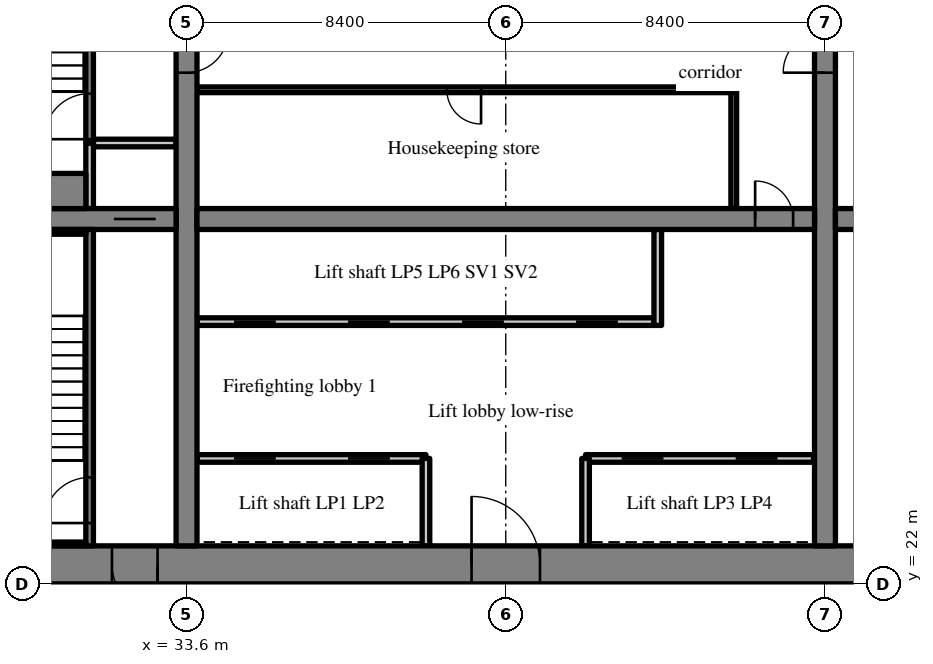
"""IFC4 building model, lengths in metres.
Left out: names, types, materials, properties, quantities, classifications, styles, units other than length and angle.
Written with IfcOpenShell. Run it as: python <this file> out.ifc"""

import sys

from ifc_helpers import new_model, si_unit, direction, frame, frame_2d, origin, place, context, subcontext, project, spatial, rectangle, extrude, source, transform, mapped, element, fill, save


model = new_model("IFC4")
c1 = context("Model", 3, precision=1e-05, world=origin(), true_north=direction((0.0, 1.0)))
c2 = subcontext(c1, "Body", "Model", "MODEL_VIEW")
j1 = project(units=[si_unit("LENGTHUNIT", "METRE"), si_unit("PLANEANGLEUNIT", "RADIAN")], contexts=[c1])
p1 = place(None, origin())
s1 = spatial("IfcSite", under=j1, at=p1, CompositionType="ELEMENT")
p2 = place(p1, origin())
s2 = spatial("IfcBuilding", under=s1, at=p2, CompositionType="ELEMENT")
p3 = place(p2, frame((0.0, 0.0, 50.6)))
s3 = spatial("IfcBuildingStorey", under=s2, at=p3, CompositionType="ELEMENT", Elevation=50.6)
m1 = source(origin(), c2, "Body", "SweptSolid", [
    extrude(rectangle(XDim=50.4, YDim=1.0, at=frame_2d((25.2, 0.0))), origin(), (0.0, 0.0, 1.0), 3.52),
])
p4 = place(p3, frame((25.2, 22.5, 0.0), z_axis=(0.0, 0.0, 1.0), x_axis=(1.0, 0.0, 0.0)))
e1 = element("IfcWall", 1, at=p4, inside=s3, PredefinedType="SHEAR", context=c2, shape_type="MappedRepresentation", body=[
    mapped(m1, transform((0.0, 0.0, 0.0), scale=1.0)),
])
m2 = source(origin(), c2, "Body", "SweptSolid", [
    extrude(rectangle(XDim=1.8, YDim=2.1, at=frame_2d((0.9, 1.05))), frame((0.0, 0.51, 0.0), z_axis=(0.0, -1.0, 0.0), x_axis=(1.0, 0.0, 0.0)), (0.0, 0.0, 1.0), 1.02),
])
p5 = place(p4, frame((15.9, 0.0, 0.0)))
e2 = element("IfcOpeningElement", 2, at=p5, cuts=e1, PredefinedType="OPENING", context=c2, shape_type="MappedRepresentation", body=[
    mapped(m2, transform((0.0, 0.0, 0.0), scale=1.0)),
])
m3 = source(origin(), c2, "Body", "SweptSolid", [
    extrude(rectangle(XDim=1.2, YDim=2.1, at=frame_2d((0.6, 1.05))), frame((0.0, 0.51, 0.0), z_axis=(0.0, -1.0, 0.0), x_axis=(1.0, 0.0, 0.0)), (0.0, 0.0, 1.0), 1.02),
])
p6 = place(p4, frame((26.987, 0.0, 0.0)))
e3 = element("IfcOpeningElement", 3, at=p6, cuts=e1, PredefinedType="OPENING", context=c2, shape_type="MappedRepresentation", body=[
    mapped(m3, transform((0.0, 0.0, 0.0), scale=1.0)),
])
m4 = source(origin(), c2, "Body", "SweptSolid", [
    extrude(rectangle(XDim=0.9, YDim=2.1, at=frame_2d((0.45, 1.05))), frame((0.0, 0.51, 0.0), z_axis=(0.0, -1.0, 0.0), x_axis=(1.0, 0.0, 0.0)), (0.0, 0.0, 1.0), 1.02),
])
p7 = place(p4, frame((33.75, 0.0, 0.0)))
e4 = element("IfcOpeningElement", 4, at=p7, cuts=e1, PredefinedType="OPENING", context=c2, shape_type="MappedRepresentation", body=[
    mapped(m4, transform((0.0, 0.0, 0.0), scale=1.0)),
])
p8 = place(p4, frame((30.75, 0.0, 0.0)))
e5 = element("IfcOpeningElement", 5, at=p8, cuts=e1, PredefinedType="OPENING", context=c2, shape_type="MappedRepresentation", body=[
    mapped(m4, transform((0.0, 0.0, 0.0), scale=1.0)),
])
p9 = place(p4, frame((38.262, 0.0, 0.0)))
e6 = element("IfcOpeningElement", 6, at=p9, cuts=e1, PredefinedType="OPENING", context=c2, shape_type="MappedRepresentation", body=[
    mapped(m4, transform((0.0, 0.0, 0.0), scale=1.0)),
])
p10 = place(p4, frame((6.438, 0.0, 0.0)))
e7 = element("IfcOpeningElement", 7, at=p10, cuts=e1, PredefinedType="OPENING", context=c2, shape_type="MappedRepresentation", body=[
    mapped(m3, transform((0.0, 0.0, 0.0), scale=1.0)),
])
p11 = place(p4, frame((47.725, 0.0, 0.0)))
e8 = element("IfcOpeningElement", 8, at=p11, cuts=e1, PredefinedType="OPENING", context=c2, shape_type="MappedRepresentation", body=[
    mapped(m3, transform((0.0, 0.0, 0.0), scale=1.0)),
])
m5 = source(origin(), c2, "Body", "SweptSolid", [
    extrude(rectangle(XDim=18.0, YDim=0.55, at=frame_2d((9.0, 0.0))), origin(), (0.0, 0.0, 1.0), 3.52),
])
p12 = place(p3, frame((33.6, 23.0, 0.0), z_axis=(0.0, 0.0, 1.0), x_axis=(0.0, 1.0, 0.0)))
e9 = element("IfcWall", 9, at=p12, inside=s3, PredefinedType="SHEAR", context=c2, shape_type="MappedRepresentation", body=[
    mapped(m5, transform((0.0, 0.0, 0.0), scale=1.0)),
])
m6 = source(origin(), c2, "Body", "SweptSolid", [
    extrude(rectangle(XDim=1.1, YDim=2.1, at=frame_2d((0.55, 1.05))), frame((0.0, 0.285, 0.0), z_axis=(0.0, -1.0, 0.0), x_axis=(1.0, 0.0, 0.0)), (0.0, 0.0, 1.0), 0.57),
])
p13 = place(p12, frame((12.45, 0.0, 0.0)))
e10 = element("IfcOpeningElement", 10, at=p13, cuts=e9, PredefinedType="OPENING", context=c2, shape_type="MappedRepresentation", body=[
    mapped(m6, transform((0.0, 0.0, 0.0), scale=1.0)),
])
p14 = place(p3, frame((50.4, 23.0, 0.0), z_axis=(0.0, 0.0, 1.0), x_axis=(0.0, 1.0, 0.0)))
e11 = element("IfcWall", 11, at=p14, inside=s3, PredefinedType="SHEAR", context=c2, shape_type="MappedRepresentation", body=[
    mapped(m5, transform((0.0, 0.0, 0.0), scale=1.0)),
])
p15 = place(p14, frame((12.45, 0.0, 0.0)))
e12 = element("IfcOpeningElement", 12, at=p15, cuts=e11, PredefinedType="OPENING", context=c2, shape_type="MappedRepresentation", body=[
    mapped(m6, transform((0.0, 0.0, 0.0), scale=1.0)),
])
m7 = source(origin(), c2, "Body", "SweptSolid", [
    extrude(rectangle(XDim=7.125, YDim=0.55, at=frame_2d((3.562, 0.0))), origin(), (0.0, 0.0, 1.0), 3.52),
])
p16 = place(p3, frame((26.2, 31.6, 0.0), z_axis=(0.0, 0.0, 1.0), x_axis=(1.0, 0.0, 0.0)))
e13 = element("IfcWall", 13, at=p16, inside=s3, PredefinedType="SHEAR", context=c2, shape_type="MappedRepresentation", body=[
    mapped(m7, transform((0.0, 0.0, 0.0), scale=1.0)),
])
p17 = place(p16, frame((5.488, 0.0, 0.0)))
e14 = element("IfcOpeningElement", 14, at=p17, cuts=e13, PredefinedType="OPENING", context=c2, shape_type="MappedRepresentation", body=[
    mapped(m6, transform((0.0, 0.0, 0.0), scale=1.0)),
])
m8 = source(origin(), c2, "Body", "SweptSolid", [
    extrude(rectangle(XDim=16.25, YDim=0.55, at=frame_2d((8.125, 0.0))), origin(), (0.0, 0.0, 1.0), 3.52),
])
p18 = place(p3, frame((33.875, 31.6, 0.0), z_axis=(0.0, 0.0, 1.0), x_axis=(1.0, 0.0, 0.0)))
e15 = element("IfcWall", 15, at=p18, inside=s3, PredefinedType="SHEAR", context=c2, shape_type="MappedRepresentation", body=[
    mapped(m8, transform((0.0, 0.0, 0.0), scale=1.0)),
])
m9 = source(origin(), c2, "Body", "SweptSolid", [
    extrude(rectangle(XDim=1.0, YDim=2.1, at=frame_2d((0.5, 1.05))), frame((0.0, 0.285, 0.0), z_axis=(0.0, -1.0, 0.0), x_axis=(1.0, 0.0, 0.0)), (0.0, 0.0, 1.0), 0.57),
])
p19 = place(p18, frame((14.687, 0.0, 0.0)))
e16 = element("IfcOpeningElement", 16, at=p19, cuts=e15, PredefinedType="OPENING", context=c2, shape_type="MappedRepresentation", body=[
    mapped(m9, transform((0.0, 0.0, 0.0), scale=1.0)),
])
p20 = place(p3, frame((50.675, 31.6, 0.0), z_axis=(0.0, 0.0, 1.0), x_axis=(1.0, 0.0, 0.0)))
e17 = element("IfcWall", 17, at=p20, inside=s3, PredefinedType="SHEAR", context=c2, shape_type="MappedRepresentation", body=[
    mapped(m8, transform((0.0, 0.0, 0.0), scale=1.0)),
])
p21 = place(p20, frame((0.562, 0.0, 0.0)))
e18 = element("IfcOpeningElement", 18, at=p21, cuts=e17, PredefinedType="OPENING", context=c2, shape_type="MappedRepresentation", body=[
    mapped(m9, transform((0.0, 0.0, 0.0), scale=1.0)),
])
m10 = source(origin(), c2, "Body", "SweptSolid", [
    extrude(rectangle(XDim=6.025, YDim=0.2, at=frame_2d((3.012, 0.0))), origin(), (0.0, 0.0, 1.0), 3.52),
])
p22 = place(p3, frame((33.875, 25.3, 0.0), z_axis=(0.0, 0.0, 1.0), x_axis=(1.0, 0.0, 0.0)))
e19 = element("IfcWall", 19, at=p22, inside=s3, PredefinedType="SOLIDWALL", context=c2, shape_type="MappedRepresentation", body=[
    mapped(m10, transform((0.0, 0.0, 0.0), scale=1.0)),
])
m11 = source(origin(), c2, "Body", "SweptSolid", [
    extrude(rectangle(XDim=1.1, YDim=2.1, at=frame_2d((0.55, 1.05))), frame((0.0, 0.11, 0.0), z_axis=(0.0, -1.0, 0.0), x_axis=(1.0, 0.0, 0.0)), (0.0, 0.0, 1.0), 0.22),
])
p23 = place(p22, frame((0.975, 0.0, 0.0)))
e20 = element("IfcOpeningElement", 20, at=p23, cuts=e19, PredefinedType="OPENING", context=c2, shape_type="MappedRepresentation", body=[
    mapped(m11, transform((0.0, 0.0, 0.0), scale=1.0)),
])
p24 = place(p22, frame((3.975, 0.0, 0.0)))
e21 = element("IfcOpeningElement", 21, at=p24, cuts=e19, PredefinedType="OPENING", context=c2, shape_type="MappedRepresentation", body=[
    mapped(m11, transform((0.0, 0.0, 0.0), scale=1.0)),
])
m12 = source(origin(), c2, "Body", "SweptSolid", [
    extrude(rectangle(XDim=6.0, YDim=0.2, at=frame_2d((3.0, 0.0))), origin(), (0.0, 0.0, 1.0), 3.52),
])
p25 = place(p3, frame((44.1, 25.3, 0.0), z_axis=(0.0, 0.0, 1.0), x_axis=(1.0, 0.0, 0.0)))
e22 = element("IfcWall", 22, at=p25, inside=s3, PredefinedType="SOLIDWALL", context=c2, shape_type="MappedRepresentation", body=[
    mapped(m12, transform((0.0, 0.0, 0.0), scale=1.0)),
])
p26 = place(p25, frame((0.95, 0.0, 0.0)))
e23 = element("IfcOpeningElement", 23, at=p26, cuts=e22, PredefinedType="OPENING", context=c2, shape_type="MappedRepresentation", body=[
    mapped(m11, transform((0.0, 0.0, 0.0), scale=1.0)),
])
p27 = place(p25, frame((3.95, 0.0, 0.0)))
e24 = element("IfcOpeningElement", 24, at=p27, cuts=e22, PredefinedType="OPENING", context=c2, shape_type="MappedRepresentation", body=[
    mapped(m11, transform((0.0, 0.0, 0.0), scale=1.0)),
])
m13 = source(origin(), c2, "Body", "SweptSolid", [
    extrude(rectangle(XDim=12.025, YDim=0.2, at=frame_2d((6.012, 0.0))), origin(), (0.0, 0.0, 1.0), 3.52),
])
p28 = place(p3, frame((33.875, 28.9, 0.0), z_axis=(0.0, 0.0, 1.0), x_axis=(1.0, 0.0, 0.0)))
e25 = element("IfcWall", 25, at=p28, inside=s3, PredefinedType="SOLIDWALL", context=c2, shape_type="MappedRepresentation", body=[
    mapped(m13, transform((0.0, 0.0, 0.0), scale=1.0)),
])
p29 = place(p28, frame((0.975, 0.0, 0.0)))
e26 = element("IfcOpeningElement", 26, at=p29, cuts=e25, PredefinedType="OPENING", context=c2, shape_type="MappedRepresentation", body=[
    mapped(m11, transform((0.0, 0.0, 0.0), scale=1.0)),
])
p30 = place(p28, frame((3.975, 0.0, 0.0)))
e27 = element("IfcOpeningElement", 27, at=p30, cuts=e25, PredefinedType="OPENING", context=c2, shape_type="MappedRepresentation", body=[
    mapped(m11, transform((0.0, 0.0, 0.0), scale=1.0)),
])
p31 = place(p28, frame((6.975, 0.0, 0.0)))
e28 = element("IfcOpeningElement", 28, at=p31, cuts=e25, PredefinedType="OPENING", context=c2, shape_type="MappedRepresentation", body=[
    mapped(m11, transform((0.0, 0.0, 0.0), scale=1.0)),
])
p32 = place(p28, frame((9.975, 0.0, 0.0)))
e29 = element("IfcOpeningElement", 29, at=p32, cuts=e25, PredefinedType="OPENING", context=c2, shape_type="MappedRepresentation", body=[
    mapped(m11, transform((0.0, 0.0, 0.0), scale=1.0)),
])
m14 = source(origin(), c2, "Body", "SweptSolid", [
    extrude(rectangle(XDim=2.3, YDim=0.2, at=frame_2d((1.15, 0.0))), origin(), (0.0, 0.0, 1.0), 3.52),
])
for number, where, z_axis, x_axis in (
    (30, (39.9, 23.0, 0.0), (0.0, 0.0, 1.0), (0.0, 1.0, 0.0)),
    (31, (44.1, 23.0, 0.0), (0.0, 0.0, 1.0), (0.0, 1.0, 0.0)),
):
    element("IfcWall", number, at=place(p3, frame(where, z_axis=z_axis, x_axis=x_axis)), inside=s3, PredefinedType="SOLIDWALL", context=c2, shape_type="MappedRepresentation", body=[
        mapped(m14, transform((0.0, 0.0, 0.0), scale=1.0)),
    ])
m15 = source(origin(), c2, "Body", "SweptSolid", [
    extrude(rectangle(XDim=2.525, YDim=0.2, at=frame_2d((1.262, 0.0))), origin(), (0.0, 0.0, 1.0), 3.52),
])
p33 = place(p3, frame((46.0, 28.8, 0.0), z_axis=(0.0, 0.0, 1.0), x_axis=(0.0, 1.0, 0.0)))
e32 = element("IfcWall", 32, at=p33, inside=s3, PredefinedType="SOLIDWALL", context=c2, shape_type="MappedRepresentation", body=[
    mapped(m15, transform((0.0, 0.0, 0.0), scale=1.0)),
])
m16 = source(origin(), c2, "Body", "SweptSolid", [
    extrude(rectangle(XDim=3.125, YDim=0.15, at=frame_2d((1.562, 0.0))), origin(), (0.0, 0.0, 1.0), 3.52),
])
p34 = place(p3, frame((48.0, 31.875, 0.0), z_axis=(0.0, 0.0, 1.0), x_axis=(0.0, 1.0, 0.0)))
e33 = element("IfcWall", 33, at=p34, inside=s3, PredefinedType="PARTITIONING", context=c2, shape_type="MappedRepresentation", body=[
    mapped(m16, transform((0.0, 0.0, 0.0), scale=1.0)),
])
m17 = source(origin(), c2, "Body", "SweptSolid", [
    extrude(rectangle(XDim=14.125, YDim=0.15, at=frame_2d((7.062, 0.0))), origin(), (0.0, 0.0, 1.0), 3.52),
])
p35 = place(p3, frame((33.875, 35.0, 0.0), z_axis=(0.0, 0.0, 1.0), x_axis=(1.0, 0.0, 0.0)))
e34 = element("IfcWall", 34, at=p35, inside=s3, PredefinedType="PARTITIONING", context=c2, shape_type="MappedRepresentation", body=[
    mapped(m17, transform((0.0, 0.0, 0.0), scale=1.0)),
])
m18 = source(origin(), c2, "Body", "SweptSolid", [
    extrude(rectangle(XDim=0.9, YDim=2.1, at=frame_2d((0.45, 1.05))), frame((0.0, 0.085, 0.0), z_axis=(0.0, -1.0, 0.0), x_axis=(1.0, 0.0, 0.0)), (0.0, 0.0, 1.0), 0.17),
])
p36 = place(p35, frame((6.575, 0.0, 0.0)))
e35 = element("IfcOpeningElement", 35, at=p36, cuts=e34, PredefinedType="OPENING", context=c2, shape_type="MappedRepresentation", body=[
    mapped(m18, transform((0.0, 0.0, 0.0), scale=1.0)),
])
m19 = source(origin(), c2, "Body", "SweptSolid", [
    extrude(rectangle(XDim=8.325, YDim=0.2, at=frame_2d((4.163, 0.0))), origin(), (0.0, 0.0, 1.0), 3.52),
])
p37 = place(p3, frame((31.05, 23.0, 0.0), z_axis=(0.0, 0.0, 1.0), x_axis=(0.0, 1.0, 0.0)))
e36 = element("IfcWall", 36, at=p37, inside=s3, PredefinedType="SOLIDWALL", context=c2, shape_type="MappedRepresentation", body=[
    mapped(m19, transform((0.0, 0.0, 0.0), scale=1.0)),
])
m20 = source(origin(), c2, "Body", "SweptSolid", [
    extrude(rectangle(XDim=1.2, YDim=2.1, at=frame_2d((0.6, 1.05))), frame((0.0, 0.11, 0.0), z_axis=(0.0, -1.0, 0.0), x_axis=(1.0, 0.0, 0.0)), (0.0, 0.0, 1.0), 0.22),
])
p38 = place(p37, frame((0.6, 0.0, 0.0)))
e37 = element("IfcOpeningElement", 37, at=p38, cuts=e36, PredefinedType="OPENING", context=c2, shape_type="MappedRepresentation", body=[
    mapped(m20, transform((0.0, 0.0, 0.0), scale=1.0)),
])
m21 = source(origin(), c2, "Body", "SweptSolid", [
    extrude(rectangle(XDim=1.725, YDim=0.2, at=frame_2d((0.863, 0.0))), origin(), (0.0, 0.0, 1.0), 3.52),
])
p39 = place(p3, frame((31.05, 31.875, 0.0), z_axis=(0.0, 0.0, 1.0), x_axis=(0.0, 1.0, 0.0)))
e38 = element("IfcWall", 38, at=p39, inside=s3, PredefinedType="SOLIDWALL", context=c2, shape_type="MappedRepresentation", body=[
    mapped(m21, transform((0.0, 0.0, 0.0), scale=1.0)),
])
m22 = source(origin(), c2, "Body", "SweptSolid", [
    extrude(rectangle(XDim=2.175, YDim=0.2, at=frame_2d((1.087, 0.0))), origin(), (0.0, 0.0, 1.0), 3.52),
])
p40 = place(p3, frame((31.15, 33.6, 0.0), z_axis=(0.0, 0.0, 1.0), x_axis=(1.0, 0.0, 0.0)))
e39 = element("IfcWall", 39, at=p40, inside=s3, PredefinedType="SOLIDWALL", context=c2, shape_type="MappedRepresentation", body=[
    mapped(m22, transform((0.0, 0.0, 0.0), scale=1.0)),
])
m23 = source(origin(), c2, "Body", "SweptSolid", [
    extrude(rectangle(XDim=7.4, YDim=0.2, at=frame_2d((3.7, 0.0))), origin(), (0.0, 0.0, 1.0), 3.52),
])
p41 = place(p3, frame((31.05, 33.6, 0.0), z_axis=(0.0, 0.0, 1.0), x_axis=(0.0, 1.0, 0.0)))
e40 = element("IfcWall", 40, at=p41, inside=s3, PredefinedType="SOLIDWALL", context=c2, shape_type="MappedRepresentation", body=[
    mapped(m23, transform((0.0, 0.0, 0.0), scale=1.0)),
])
p42 = place(p41, frame((0.1, 0.0, 0.0)))
e41 = element("IfcOpeningElement", 41, at=p42, cuts=e40, PredefinedType="OPENING", context=c2, shape_type="MappedRepresentation", body=[
    mapped(m20, transform((0.0, 0.0, 0.0), scale=1.0)),
])
m24 = source(origin(), c2, "Body", "SweptSolid", [
    extrude(rectangle(XDim=4.75, YDim=0.1, at=frame_2d((2.375, 0.0))), origin(), (0.0, 0.0, 1.0), 3.52),
])
p43 = place(p3, frame((26.2, 23.05, 0.0), z_axis=(0.0, 0.0, 1.0), x_axis=(1.0, 0.0, 0.0)))
e42 = element("IfcWall", 42, at=p43, inside=s3, PredefinedType="SOLIDWALL", context=c2, shape_type="MappedRepresentation", body=[
    mapped(m24, transform((0.0, 0.0, 0.0), scale=1.0)),
])
m25 = source(origin(), c2, "Body", "SweptSolid", [
    extrude(rectangle(XDim=4.75, YDim=0.125, at=frame_2d((2.375, 0.0))), origin(), (0.0, 0.0, 1.0), 3.52),
])
p44 = place(p3, frame((26.2, 31.262, 0.0), z_axis=(0.0, 0.0, 1.0), x_axis=(1.0, 0.0, 0.0)))
e43 = element("IfcWall", 43, at=p44, inside=s3, PredefinedType="SOLIDWALL", context=c2, shape_type="MappedRepresentation", body=[
    mapped(m25, transform((0.0, 0.0, 0.0), scale=1.0)),
])
m26 = source(origin(), c2, "Body", "SweptSolid", [
    extrude(rectangle(XDim=4.75, YDim=0.925, at=frame_2d((2.375, 0.0))), origin(), (0.0, 0.0, 1.0), 3.52),
])
p45 = place(p3, frame((26.2, 32.337, 0.0), z_axis=(0.0, 0.0, 1.0), x_axis=(1.0, 0.0, 0.0)))
e44 = element("IfcWall", 44, at=p45, inside=s3, PredefinedType="SOLIDWALL", context=c2, shape_type="MappedRepresentation", body=[
    mapped(m26, transform((0.0, 0.0, 0.0), scale=1.0)),
])
m27 = source(origin(), c2, "Body", "SweptSolid", [
    extrude(rectangle(XDim=1.8, YDim=2.1, at=frame_2d((0.9, 1.05))), frame((0.0, 0.375, 0.0), z_axis=(0.0, -1.0, 0.0), x_axis=(1.0, 0.0, 0.0)), (0.0, 0.0, 1.0), 0.05),
])
p46 = place(p5, origin())
e45 = element("IfcDoor", 45, at=p46, inside=s3, OperationType="DOUBLE_DOOR_SINGLE_SWING", PredefinedType="DOOR", context=c2, shape_type="MappedRepresentation", body=[
    mapped(m27, transform((0.0, 0.0, 0.0), scale=1.0)),
])
fill(e2, e45)
m28 = source(origin(), c2, "Body", "SweptSolid", [
    extrude(rectangle(XDim=1.0, YDim=2.1, at=frame_2d((0.5, 1.05))), frame((0.0, 0.025, 0.0), z_axis=(0.0, -1.0, 0.0), x_axis=(1.0, 0.0, 0.0)), (0.0, 0.0, 1.0), 0.05),
])
p47 = place(p19, origin())
e46 = element("IfcDoor", 46, at=p47, inside=s3, OperationType="SINGLE_SWING_LEFT", PredefinedType="DOOR", context=c2, shape_type="MappedRepresentation", body=[
    mapped(m28, transform((0.0, 0.0, 0.0), scale=1.0)),
])
fill(e16, e46)
m29 = source(origin(), c2, "Body", "SweptSolid", [
    extrude(rectangle(XDim=1.1, YDim=2.1, at=frame_2d((0.55, 1.05))), frame((0.0, 0.025, 0.0), z_axis=(0.0, -1.0, 0.0), x_axis=(1.0, 0.0, 0.0)), (0.0, 0.0, 1.0), 0.05),
])
p48 = place(p23, origin())
e47 = element("IfcDoor", 47, at=p48, inside=s3, OperationType="SLIDING_TO_LEFT", PredefinedType="DOOR", context=c2, shape_type="MappedRepresentation", body=[
    mapped(m29, transform((0.0, 0.0, 0.0), scale=1.0)),
])
fill(e20, e47)
p49 = place(p24, origin())
e48 = element("IfcDoor", 48, at=p49, inside=s3, OperationType="SLIDING_TO_RIGHT", PredefinedType="DOOR", context=c2, shape_type="MappedRepresentation", body=[
    mapped(m29, transform((0.0, 0.0, 0.0), scale=1.0)),
])
fill(e21, e48)
p50 = place(p26, origin())
e49 = element("IfcDoor", 49, at=p50, inside=s3, OperationType="SLIDING_TO_LEFT", PredefinedType="DOOR", context=c2, shape_type="MappedRepresentation", body=[
    mapped(m29, transform((0.0, 0.0, 0.0), scale=1.0)),
])
fill(e23, e49)
p51 = place(p27, origin())
e50 = element("IfcDoor", 50, at=p51, inside=s3, OperationType="SLIDING_TO_RIGHT", PredefinedType="DOOR", context=c2, shape_type="MappedRepresentation", body=[
    mapped(m29, transform((0.0, 0.0, 0.0), scale=1.0)),
])
fill(e24, e50)
p52 = place(p29, origin())
e51 = element("IfcDoor", 51, at=p52, inside=s3, OperationType="SLIDING_TO_LEFT", PredefinedType="DOOR", context=c2, shape_type="MappedRepresentation", body=[
    mapped(m29, transform((0.0, 0.0, 0.0), scale=1.0)),
])
fill(e26, e51)
p53 = place(p30, origin())
e52 = element("IfcDoor", 52, at=p53, inside=s3, OperationType="SLIDING_TO_RIGHT", PredefinedType="DOOR", context=c2, shape_type="MappedRepresentation", body=[
    mapped(m29, transform((0.0, 0.0, 0.0), scale=1.0)),
])
fill(e27, e52)
p54 = place(p31, origin())
e53 = element("IfcDoor", 53, at=p54, inside=s3, OperationType="SLIDING_TO_LEFT", PredefinedType="DOOR", context=c2, shape_type="MappedRepresentation", body=[
    mapped(m29, transform((0.0, 0.0, 0.0), scale=1.0)),
])
fill(e28, e53)
p55 = place(p32, origin())
e54 = element("IfcDoor", 54, at=p55, inside=s3, OperationType="SLIDING_TO_RIGHT", PredefinedType="DOOR", context=c2, shape_type="MappedRepresentation", body=[
    mapped(m29, transform((0.0, 0.0, 0.0), scale=1.0)),
])
fill(e29, e54)
m30 = source(origin(), c2, "Body", "SweptSolid", [
    extrude(rectangle(XDim=0.9, YDim=2.1, at=frame_2d((0.45, 1.05))), frame((0.0, 0.025, 0.0), z_axis=(0.0, -1.0, 0.0), x_axis=(1.0, 0.0, 0.0)), (0.0, 0.0, 1.0), 0.05),
])
p56 = place(p36, origin())
e55 = element("IfcDoor", 55, at=p56, inside=s3, OperationType="SINGLE_SWING_RIGHT", PredefinedType="DOOR", context=c2, shape_type="MappedRepresentation", body=[
    mapped(m30, transform((0.0, 0.0, 0.0), scale=1.0)),
])
fill(e35, e55)
m31 = source(origin(), c2, "Body", "SweptSolid", [
    extrude(rectangle(XDim=1.2, YDim=2.1, at=frame_2d((0.6, 1.05))), frame((0.0, 0.025, 0.0), z_axis=(0.0, -1.0, 0.0), x_axis=(1.0, 0.0, 0.0)), (0.0, 0.0, 1.0), 0.05),
])
p57 = place(p38, origin())
e56 = element("IfcDoor", 56, at=p57, inside=s3, OperationType="SINGLE_SWING_LEFT", PredefinedType="DOOR", context=c2, shape_type="MappedRepresentation", body=[
    mapped(m31, transform((0.0, 0.0, 0.0), scale=1.0)),
])
fill(e37, e56)
m32 = source(origin(), c2, "Body", "SweptSolid", [
    extrude(rectangle(XDim=1.2, YDim=2.1, at=frame_2d((0.6, 1.05))), frame((0.0, 0.375, 0.0), z_axis=(0.0, -1.0, 0.0), x_axis=(1.0, 0.0, 0.0)), (0.0, 0.0, 1.0), 0.05),
])
p58 = place(p10, origin())
e57 = element("IfcDoor", 57, at=p58, inside=s3, OperationType="SINGLE_SWING_RIGHT", PredefinedType="DOOR", context=c2, shape_type="MappedRepresentation", body=[
    mapped(m32, transform((0.0, 0.0, 0.0), scale=1.0)),
])
fill(e7, e57)
p59 = place(p17, origin())
e58 = element("IfcDoor", 58, at=p59, inside=s3, OperationType="SLIDING_TO_LEFT", PredefinedType="DOOR", context=c2, shape_type="MappedRepresentation", body=[
    mapped(m29, transform((0.0, 0.0, 0.0), scale=1.0)),
])
fill(e14, e58)
p60 = place(p42, origin())
e59 = element("IfcDoor", 59, at=p60, inside=s3, OperationType="SINGLE_SWING_LEFT", PredefinedType="DOOR", context=c2, shape_type="MappedRepresentation", body=[
    mapped(m31, transform((0.0, 0.0, 0.0), scale=1.0)),
])
fill(e41, e59)
p61 = place(p13, origin())
e60 = element("IfcDoor", 60, at=p61, inside=s3, OperationType="SINGLE_SWING_RIGHT", PredefinedType="DOOR", context=c2, shape_type="MappedRepresentation", body=[
    mapped(m29, transform((0.0, 0.0, 0.0), scale=1.0)),
])
fill(e10, e60)
p62 = place(p15, origin())
e61 = element("IfcDoor", 61, at=p62, inside=s3, OperationType="SINGLE_SWING_LEFT", PredefinedType="DOOR", context=c2, shape_type="MappedRepresentation", body=[
    mapped(m29, transform((0.0, 0.0, 0.0), scale=1.0)),
])
fill(e12, e61)
save(model, sys.argv[1])
